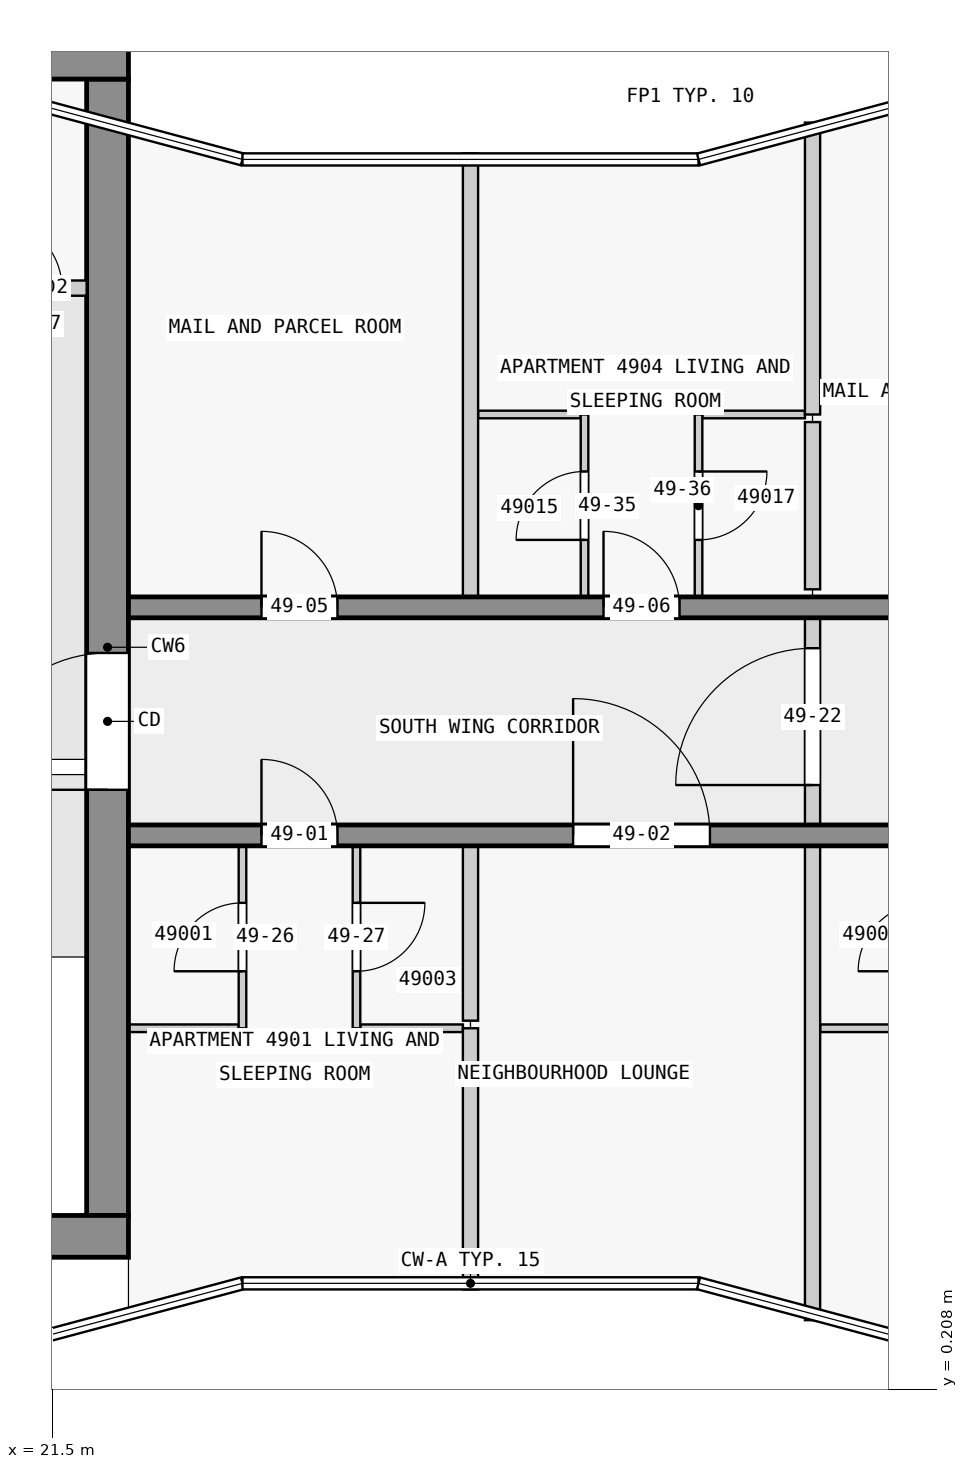
"""IFC4 building model, lengths in metres.
Left out: names, types, materials, properties, quantities, classifications, styles, units other than length and angle.
Written with IfcOpenShell. Run it as: python <this file> out.ifc"""

import sys

from ifc_helpers import new_model, si_unit, direction, frame, frame_2d, origin, place, context, subcontext, project, spatial, rectangle, extrude, element, fill, save


model = new_model("IFC4")
c1 = context("Model", 3, precision=1e-05, world=origin(), true_north=direction((0.0, 1.0)))
c2 = subcontext(c1, "Body", "Model", "MODEL_VIEW")
j1 = project(units=[si_unit("LENGTHUNIT", "METRE"), si_unit("PLANEANGLEUNIT", "RADIAN")], contexts=[c1])
p1 = place(None, origin())
s1 = spatial("IfcSite", under=j1, at=p1, CompositionType="ELEMENT")
p2 = place(p1, origin())
s2 = spatial("IfcBuilding", under=s1, at=p2, CompositionType="ELEMENT")
p3 = place(p2, frame((0.0, 0.0, 190.9)))
s3 = spatial("IfcBuildingStorey", under=s2, at=p3, CompositionType="ELEMENT", Elevation=190.9)
p4 = place(p3, frame((1.75, 2.225, 0.0), z_axis=(0.0, 0.0, 1.0), x_axis=(1.0, 0.0, 0.0)))
e1 = element("IfcWall", 1, at=p4, inside=s3, PredefinedType="SHEAR", context=c2, shape_type="SweptSolid", body=[
    extrude(rectangle(XDim=20.75, YDim=0.55, at=frame_2d((10.375, 0.0))), origin(), (0.0, 0.0, 1.0), 3.25),
])
p5 = place(p3, frame((1.38, 17.725, 0.0), z_axis=(0.0, 0.0, 1.0), x_axis=(1.0, 0.0, 0.0)))
e2 = element("IfcWall", 2, at=p5, inside=s3, PredefinedType="SHEAR", context=c2, shape_type="SweptSolid", body=[
    extrude(rectangle(XDim=21.12, YDim=0.55, at=frame_2d((10.56, 0.0))), origin(), (0.0, 0.0, 1.0), 3.25),
])
p6 = place(p5, frame((6.35, 0.0, 0.0)))
e3 = element("IfcOpeningElement", 3, at=p6, cuts=e2, PredefinedType="OPENING", context=c2, shape_type="SweptSolid", body=[
    extrude(rectangle(XDim=1.8, YDim=2.1, at=frame_2d((0.9, 1.05))), frame((0.0, 0.285, 0.0), z_axis=(0.0, -1.0, 0.0), x_axis=(1.0, 0.0, 0.0)), (0.0, 0.0, 1.0), 0.57),
])
p7 = place(p3, frame((22.225, 2.5, 0.0), z_axis=(0.0, 0.0, 1.0), x_axis=(0.0, 1.0, 0.0)))
e4 = element("IfcWall", 4, at=p7, inside=s3, PredefinedType="SHEAR", context=c2, shape_type="SweptSolid", body=[
    extrude(rectangle(XDim=14.95, YDim=0.55, at=frame_2d((7.475, 0.0))), origin(), (0.0, 0.0, 1.0), 3.25),
])
p8 = place(p7, frame((5.6, 0.0, 0.0)))
e5 = element("IfcOpeningElement", 5, at=p8, cuts=e4, PredefinedType="OPENING", context=c2, shape_type="SweptSolid", body=[
    extrude(rectangle(XDim=1.8, YDim=2.1, at=frame_2d((0.9, 1.05))), frame((0.0, 0.285, 0.0), z_axis=(0.0, -1.0, 0.0), x_axis=(1.0, 0.0, 0.0)), (0.0, 0.0, 1.0), 0.57),
])
p9 = place(p3, frame((22.5, 7.5, 0.0), z_axis=(0.0, 0.0, 1.0), x_axis=(1.0, 0.0, 0.0)))
e6 = element("IfcWall", 6, at=p9, inside=s3, PredefinedType="SHEAR", context=c2, shape_type="SweptSolid", body=[
    extrude(rectangle(XDim=22.5, YDim=0.275, at=frame_2d((11.25, 0.0))), origin(), (0.0, 0.0, 1.0), 3.25),
])
p10 = place(p9, frame((1.75, 0.0, 0.0)))
e7 = element("IfcOpeningElement", 7, at=p10, cuts=e6, PredefinedType="OPENING", context=c2, shape_type="SweptSolid", body=[
    extrude(rectangle(XDim=1.0, YDim=2.1, at=frame_2d((0.5, 1.05))), frame((0.0, 0.147, 0.0), z_axis=(0.0, -1.0, 0.0), x_axis=(1.0, 0.0, 0.0)), (0.0, 0.0, 1.0), 0.295),
])
p11 = place(p9, frame((5.85, 0.0, 0.0)))
e8 = element("IfcOpeningElement", 8, at=p11, cuts=e6, PredefinedType="OPENING", context=c2, shape_type="SweptSolid", body=[
    extrude(rectangle(XDim=1.8, YDim=2.1, at=frame_2d((0.9, 1.05))), frame((0.0, 0.147, 0.0), z_axis=(0.0, -1.0, 0.0), x_axis=(1.0, 0.0, 0.0)), (0.0, 0.0, 1.0), 0.295),
])
p12 = place(p9, frame((10.75, 0.0, 0.0)))
e9 = element("IfcOpeningElement", 9, at=p12, cuts=e6, PredefinedType="OPENING", context=c2, shape_type="SweptSolid", body=[
    extrude(rectangle(XDim=1.0, YDim=2.1, at=frame_2d((0.5, 1.05))), frame((0.0, 0.147, 0.0), z_axis=(0.0, -1.0, 0.0), x_axis=(1.0, 0.0, 0.0)), (0.0, 0.0, 1.0), 0.295),
])
p13 = place(p9, frame((16.85, 0.0, 0.0)))
e10 = element("IfcOpeningElement", 10, at=p13, cuts=e6, PredefinedType="OPENING", context=c2, shape_type="SweptSolid", body=[
    extrude(rectangle(XDim=1.0, YDim=2.1, at=frame_2d((0.5, 1.05))), frame((0.0, 0.147, 0.0), z_axis=(0.0, -1.0, 0.0), x_axis=(1.0, 0.0, 0.0)), (0.0, 0.0, 1.0), 0.295),
])
p14 = place(p3, frame((22.5, 10.5, 0.0), z_axis=(0.0, 0.0, 1.0), x_axis=(1.0, 0.0, 0.0)))
e11 = element("IfcWall", 11, at=p14, inside=s3, PredefinedType="SHEAR", context=c2, shape_type="SweptSolid", body=[
    extrude(rectangle(XDim=22.5, YDim=0.275, at=frame_2d((11.25, 0.0))), origin(), (0.0, 0.0, 1.0), 3.25),
])
p15 = place(p14, frame((1.75, 0.0, 0.0)))
e12 = element("IfcOpeningElement", 12, at=p15, cuts=e11, PredefinedType="OPENING", context=c2, shape_type="SweptSolid", body=[
    extrude(rectangle(XDim=1.0, YDim=2.1, at=frame_2d((0.5, 1.05))), frame((0.0, 0.147, 0.0), z_axis=(0.0, -1.0, 0.0), x_axis=(1.0, 0.0, 0.0)), (0.0, 0.0, 1.0), 0.295),
])
p16 = place(p14, frame((6.25, 0.0, 0.0)))
e13 = element("IfcOpeningElement", 13, at=p16, cuts=e11, PredefinedType="OPENING", context=c2, shape_type="SweptSolid", body=[
    extrude(rectangle(XDim=1.0, YDim=2.1, at=frame_2d((0.5, 1.05))), frame((0.0, 0.147, 0.0), z_axis=(0.0, -1.0, 0.0), x_axis=(1.0, 0.0, 0.0)), (0.0, 0.0, 1.0), 0.295),
])
p17 = place(p14, frame((10.75, 0.0, 0.0)))
e14 = element("IfcOpeningElement", 14, at=p17, cuts=e11, PredefinedType="OPENING", context=c2, shape_type="SweptSolid", body=[
    extrude(rectangle(XDim=1.0, YDim=2.1, at=frame_2d((0.5, 1.05))), frame((0.0, 0.147, 0.0), z_axis=(0.0, -1.0, 0.0), x_axis=(1.0, 0.0, 0.0)), (0.0, 0.0, 1.0), 0.295),
])
p18 = place(p14, frame((15.25, 0.0, 0.0)))
e15 = element("IfcOpeningElement", 15, at=p18, cuts=e11, PredefinedType="OPENING", context=c2, shape_type="SweptSolid", body=[
    extrude(rectangle(XDim=1.0, YDim=2.1, at=frame_2d((0.5, 1.05))), frame((0.0, 0.147, 0.0), z_axis=(0.0, -1.0, 0.0), x_axis=(1.0, 0.0, 0.0)), (0.0, 0.0, 1.0), 0.295),
])
p19 = place(p14, frame((18.75, 0.0, 0.0)))
e16 = element("IfcOpeningElement", 16, at=p19, cuts=e11, PredefinedType="OPENING", context=c2, shape_type="SweptSolid", body=[
    extrude(rectangle(XDim=0.9, YDim=2.1, at=frame_2d((0.45, 1.05))), frame((0.0, 0.147, 0.0), z_axis=(0.0, -1.0, 0.0), x_axis=(1.0, 0.0, 0.0)), (0.0, 0.0, 1.0), 0.295),
])
p20 = place(p14, frame((20.95, 0.0, 0.0)))
e17 = element("IfcOpeningElement", 17, at=p20, cuts=e11, PredefinedType="OPENING", context=c2, shape_type="SweptSolid", body=[
    extrude(rectangle(XDim=1.0, YDim=2.1, at=frame_2d((0.5, 1.05))), frame((0.0, 0.147, 0.0), z_axis=(0.0, -1.0, 0.0), x_axis=(1.0, 0.0, 0.0)), (0.0, 0.0, 1.0), 0.295),
])
p21 = place(p3, frame((18.6, 14.7, 0.0), z_axis=(0.0, 0.0, 1.0), x_axis=(1.0, 0.0, 0.0)))
e18 = element("IfcWall", 18, at=p21, inside=s3, PredefinedType="PARTITIONING", context=c2, shape_type="SweptSolid", body=[
    extrude(rectangle(XDim=3.35, YDim=0.2, at=frame_2d((1.675, 0.0))), origin(), (0.0, 0.0, 1.0), 3.25),
])
p22 = place(p21, frame((0.45, 0.0, 0.0)))
e19 = element("IfcOpeningElement", 19, at=p22, cuts=e18, PredefinedType="OPENING", context=c2, shape_type="SweptSolid", body=[
    extrude(rectangle(XDim=0.9, YDim=2.1, at=frame_2d((0.45, 1.05))), frame((0.0, 0.11, 0.0), z_axis=(0.0, -1.0, 0.0), x_axis=(1.0, 0.0, 0.0)), (0.0, 0.0, 1.0), 0.22),
])
p23 = place(p21, frame((2.125, 0.0, 0.0)))
e20 = element("IfcOpeningElement", 20, at=p23, cuts=e18, PredefinedType="OPENING", context=c2, shape_type="SweptSolid", body=[
    extrude(rectangle(XDim=0.9, YDim=2.1, at=frame_2d((0.45, 1.05))), frame((0.0, 0.11, 0.0), z_axis=(0.0, -1.0, 0.0), x_axis=(1.0, 0.0, 0.0)), (0.0, 0.0, 1.0), 0.22),
])
p24 = place(p3, frame((22.5, 4.962, 0.0), z_axis=(0.0, 0.0, 1.0), x_axis=(1.0, 0.0, 0.0)))
e21 = element("IfcWall", 21, at=p24, inside=s3, PredefinedType="PARTITIONING", context=c2, shape_type="SweptSolid", body=[
    extrude(rectangle(XDim=1.45, YDim=0.1, at=frame_2d((0.725, 0.0))), origin(), (0.0, 0.0, 1.0), 3.25),
])
for number, where, z_axis, x_axis in (
    (22, (25.55, 4.962, 0.0), (0.0, 0.0, 1.0), (1.0, 0.0, 0.0)),
    (23, (31.6, 4.962, 0.0), (0.0, 0.0, 1.0), (1.0, 0.0, 0.0)),
    (24, (28.45, 13.038, 0.0), (0.0, 0.0, 1.0), (-1.0, 0.0, 0.0)),
    (25, (31.4, 13.038, 0.0), (0.0, 0.0, 1.0), (-1.0, 0.0, 0.0)),
):
    element("IfcWall", number, at=place(p3, frame(where, z_axis=z_axis, x_axis=x_axis)), inside=s3, PredefinedType="PARTITIONING", context=c2, shape_type="SweptSolid", body=[
        extrude(rectangle(XDim=1.35, YDim=0.1, at=frame_2d((0.675, 0.0))), origin(), (0.0, 0.0, 1.0), 3.25),
    ])
p25 = place(p3, frame((24.0, 4.962, 0.0), z_axis=(0.0, 0.0, 1.0), x_axis=(0.0, 1.0, 0.0)))
e26 = element("IfcWall", 26, at=p25, inside=s3, PredefinedType="PARTITIONING", context=c2, shape_type="SweptSolid", body=[
    extrude(rectangle(XDim=2.4, YDim=0.1, at=frame_2d((1.2, 0.0))), origin(), (0.0, 0.0, 1.0), 3.25),
])
p26 = place(p25, frame((0.75, 0.0, 0.0)))
e27 = element("IfcOpeningElement", 27, at=p26, cuts=e26, PredefinedType="OPENING", context=c2, shape_type="SweptSolid", body=[
    extrude(rectangle(XDim=0.9, YDim=2.1, at=frame_2d((0.45, 1.05))), frame((0.0, 0.06, 0.0), z_axis=(0.0, -1.0, 0.0), x_axis=(1.0, 0.0, 0.0)), (0.0, 0.0, 1.0), 0.12),
])
p27 = place(p3, frame((25.5, 7.363, 0.0), z_axis=(0.0, 0.0, 1.0), x_axis=(0.0, -1.0, 0.0)))
e28 = element("IfcWall", 28, at=p27, inside=s3, PredefinedType="PARTITIONING", context=c2, shape_type="SweptSolid", body=[
    extrude(rectangle(XDim=2.4, YDim=0.1, at=frame_2d((1.2, 0.0))), origin(), (0.0, 0.0, 1.0), 3.25),
])
p28 = place(p27, frame((0.75, 0.0, 0.0)))
e29 = element("IfcOpeningElement", 29, at=p28, cuts=e28, PredefinedType="OPENING", context=c2, shape_type="SweptSolid", body=[
    extrude(rectangle(XDim=0.9, YDim=2.1, at=frame_2d((0.45, 1.05))), frame((0.0, 0.06, 0.0), z_axis=(0.0, -1.0, 0.0), x_axis=(1.0, 0.0, 0.0)), (0.0, 0.0, 1.0), 0.12),
])
p29 = place(p3, frame((27.0, 4.962, 0.0), z_axis=(0.0, 0.0, 1.0), x_axis=(0.0, -1.0, 0.0)))
e30 = element("IfcWall", 30, at=p29, inside=s3, PredefinedType="PARTITIONING", context=c2, shape_type="SweptSolid", body=[
    extrude(rectangle(XDim=3.436, YDim=0.2, at=frame_2d((1.718, 0.0))), origin(), (0.0, 0.0, 1.0), 3.25),
])
p30 = place(p3, frame((27.0, 5.062, 0.0), z_axis=(0.0, 0.0, 1.0), x_axis=(0.0, 1.0, 0.0)))
e31 = element("IfcWall", 31, at=p30, inside=s3, PredefinedType="PARTITIONING", context=c2, shape_type="SweptSolid", body=[
    extrude(rectangle(XDim=2.3, YDim=0.2, at=frame_2d((1.15, 0.0))), origin(), (0.0, 0.0, 1.0), 3.25),
])
p31 = place(p3, frame((27.0, 10.637, 0.0), z_axis=(0.0, 0.0, 1.0), x_axis=(0.0, 1.0, 0.0)))
e32 = element("IfcWall", 32, at=p31, inside=s3, PredefinedType="PARTITIONING", context=c2, shape_type="SweptSolid", body=[
    extrude(rectangle(XDim=5.836, YDim=0.2, at=frame_2d((2.918, 0.0))), origin(), (0.0, 0.0, 1.0), 3.25),
])
p32 = place(p3, frame((28.5, 10.637, 0.0), z_axis=(0.0, 0.0, 1.0), x_axis=(0.0, 1.0, 0.0)))
e33 = element("IfcWall", 33, at=p32, inside=s3, PredefinedType="PARTITIONING", context=c2, shape_type="SweptSolid", body=[
    extrude(rectangle(XDim=2.4, YDim=0.1, at=frame_2d((1.2, 0.0))), origin(), (0.0, 0.0, 1.0), 3.25),
])
p33 = place(p32, frame((0.75, 0.0, 0.0)))
e34 = element("IfcOpeningElement", 34, at=p33, cuts=e33, PredefinedType="OPENING", context=c2, shape_type="SweptSolid", body=[
    extrude(rectangle(XDim=0.9, YDim=2.1, at=frame_2d((0.45, 1.05))), frame((0.0, 0.06, 0.0), z_axis=(0.0, -1.0, 0.0), x_axis=(1.0, 0.0, 0.0)), (0.0, 0.0, 1.0), 0.12),
])
p34 = place(p3, frame((30.0, 13.038, 0.0), z_axis=(0.0, 0.0, 1.0), x_axis=(0.0, -1.0, 0.0)))
e35 = element("IfcWall", 35, at=p34, inside=s3, PredefinedType="PARTITIONING", context=c2, shape_type="SweptSolid", body=[
    extrude(rectangle(XDim=2.4, YDim=0.1, at=frame_2d((1.2, 0.0))), origin(), (0.0, 0.0, 1.0), 3.25),
])
p35 = place(p34, frame((0.75, 0.0, 0.0)))
e36 = element("IfcOpeningElement", 36, at=p35, cuts=e35, PredefinedType="OPENING", context=c2, shape_type="SweptSolid", body=[
    extrude(rectangle(XDim=0.9, YDim=2.1, at=frame_2d((0.45, 1.05))), frame((0.0, 0.06, 0.0), z_axis=(0.0, -1.0, 0.0), x_axis=(1.0, 0.0, 0.0)), (0.0, 0.0, 1.0), 0.12),
])
p36 = place(p3, frame((31.5, 16.878, 0.0), z_axis=(0.0, 0.0, 1.0), x_axis=(0.0, -1.0, 0.0)))
e37 = element("IfcWall", 37, at=p36, inside=s3, PredefinedType="PARTITIONING", context=c2, shape_type="SweptSolid", body=[
    extrude(rectangle(XDim=3.84, YDim=0.2, at=frame_2d((1.92, 0.0))), origin(), (0.0, 0.0, 1.0), 3.25),
])
p37 = place(p3, frame((31.5, 1.122, 0.0), z_axis=(0.0, 0.0, 1.0), x_axis=(0.0, 1.0, 0.0)))
e38 = element("IfcWall", 38, at=p37, inside=s3, PredefinedType="PARTITIONING", context=c2, shape_type="SweptSolid", body=[
    extrude(rectangle(XDim=6.24, YDim=0.2, at=frame_2d((3.12, 0.0))), origin(), (0.0, 0.0, 1.0), 3.25),
])
p38 = place(p3, frame((31.5, 10.738, 0.0), z_axis=(0.0, 0.0, 1.0), x_axis=(0.0, 1.0, 0.0)))
e39 = element("IfcWall", 39, at=p38, inside=s3, PredefinedType="PARTITIONING", context=c2, shape_type="SweptSolid", body=[
    extrude(rectangle(XDim=2.2, YDim=0.2, at=frame_2d((1.1, 0.0))), origin(), (0.0, 0.0, 1.0), 3.25),
])
p39 = place(p3, frame((31.5, 7.462, 0.0), z_axis=(0.0, 0.0, 1.0), x_axis=(0.0, 1.0, 0.0)))
e40 = element("IfcWall", 40, at=p39, inside=s3, PredefinedType="PARTITIONING", context=c2, shape_type="SweptSolid", body=[
    extrude(rectangle(XDim=3.175, YDim=0.2, at=frame_2d((1.587, 0.0))), origin(), (0.0, 0.0, 1.0), 3.25),
])
p40 = place(p39, frame((0.7, 0.0, 0.0)))
e41 = element("IfcOpeningElement", 41, at=p40, cuts=e40, PredefinedType="OPENING", context=c2, shape_type="SweptSolid", body=[
    extrude(rectangle(XDim=1.8, YDim=2.1, at=frame_2d((0.9, 1.05))), frame((0.0, 0.11, 0.0), z_axis=(0.0, -1.0, 0.0), x_axis=(1.0, 0.0, 0.0)), (0.0, 0.0, 1.0), 0.22),
])
p41 = place(p8, origin())
e42 = element("IfcDoor", 42, at=p41, inside=s3, OperationType="DOUBLE_DOOR_SINGLE_SWING", PredefinedType="DOOR", context=c2, shape_type="SweptSolid", body=[
    extrude(rectangle(XDim=1.8, YDim=2.1, at=frame_2d((0.9, 1.05))), frame((0.0, 0.025, 0.0), z_axis=(0.0, -1.0, 0.0), x_axis=(1.0, 0.0, 0.0)), (0.0, 0.0, 1.0), 0.05),
])
fill(e5, e42)
p42 = place(p23, origin())
e43 = element("IfcDoor", 43, at=p42, inside=s3, OperationType="SINGLE_SWING_LEFT", PredefinedType="DOOR", context=c2, shape_type="SweptSolid", body=[
    extrude(rectangle(XDim=0.9, YDim=2.1, at=frame_2d((0.45, 1.05))), frame((0.0, 0.025, 0.0), z_axis=(0.0, -1.0, 0.0), x_axis=(1.0, 0.0, 0.0)), (0.0, 0.0, 1.0), 0.05),
])
fill(e20, e43)
p43 = place(p10, origin())
e44 = element("IfcDoor", 44, at=p43, inside=s3, OperationType="SINGLE_SWING_LEFT", PredefinedType="DOOR", context=c2, shape_type="SweptSolid", body=[
    extrude(rectangle(XDim=1.0, YDim=2.1, at=frame_2d((0.5, 1.05))), frame((0.0, 0.025, 0.0), z_axis=(0.0, -1.0, 0.0), x_axis=(1.0, 0.0, 0.0)), (0.0, 0.0, 1.0), 0.05),
])
fill(e7, e44)
p44 = place(p11, origin())
e45 = element("IfcDoor", 45, at=p44, inside=s3, OperationType="SINGLE_SWING_LEFT", PredefinedType="DOOR", context=c2, shape_type="SweptSolid", body=[
    extrude(rectangle(XDim=1.8, YDim=2.1, at=frame_2d((0.9, 1.05))), frame((0.0, 0.025, 0.0), z_axis=(0.0, -1.0, 0.0), x_axis=(1.0, 0.0, 0.0)), (0.0, 0.0, 1.0), 0.05),
])
fill(e8, e45)
p45 = place(p15, origin())
e46 = element("IfcDoor", 46, at=p45, inside=s3, OperationType="SINGLE_SWING_LEFT", PredefinedType="DOOR", context=c2, shape_type="SweptSolid", body=[
    extrude(rectangle(XDim=1.0, YDim=2.1, at=frame_2d((0.5, 1.05))), frame((0.0, 0.025, 0.0), z_axis=(0.0, -1.0, 0.0), x_axis=(1.0, 0.0, 0.0)), (0.0, 0.0, 1.0), 0.05),
])
fill(e12, e46)
p46 = place(p16, origin())
e47 = element("IfcDoor", 47, at=p46, inside=s3, OperationType="SINGLE_SWING_LEFT", PredefinedType="DOOR", context=c2, shape_type="SweptSolid", body=[
    extrude(rectangle(XDim=1.0, YDim=2.1, at=frame_2d((0.5, 1.05))), frame((0.0, 0.025, 0.0), z_axis=(0.0, -1.0, 0.0), x_axis=(1.0, 0.0, 0.0)), (0.0, 0.0, 1.0), 0.05),
])
fill(e13, e47)
p47 = place(p40, origin())
e48 = element("IfcDoor", 48, at=p47, inside=s3, OperationType="SINGLE_SWING_RIGHT", PredefinedType="DOOR", context=c2, shape_type="SweptSolid", body=[
    extrude(rectangle(XDim=1.8, YDim=2.1, at=frame_2d((0.9, 1.05))), frame((0.0, 0.025, 0.0), z_axis=(0.0, -1.0, 0.0), x_axis=(1.0, 0.0, 0.0)), (0.0, 0.0, 1.0), 0.05),
])
fill(e41, e48)
p48 = place(p26, origin())
e49 = element("IfcDoor", 49, at=p48, inside=s3, OperationType="SINGLE_SWING_RIGHT", PredefinedType="DOOR", context=c2, shape_type="SweptSolid", body=[
    extrude(rectangle(XDim=0.9, YDim=2.1, at=frame_2d((0.45, 1.05))), frame((0.0, 0.025, 0.0), z_axis=(0.0, -1.0, 0.0), x_axis=(1.0, 0.0, 0.0)), (0.0, 0.0, 1.0), 0.05),
])
fill(e27, e49)
p49 = place(p28, origin())
e50 = element("IfcDoor", 50, at=p49, inside=s3, OperationType="SINGLE_SWING_RIGHT", PredefinedType="DOOR", context=c2, shape_type="SweptSolid", body=[
    extrude(rectangle(XDim=0.9, YDim=2.1, at=frame_2d((0.45, 1.05))), frame((0.0, 0.025, 0.0), z_axis=(0.0, -1.0, 0.0), x_axis=(1.0, 0.0, 0.0)), (0.0, 0.0, 1.0), 0.05),
])
fill(e29, e50)
p50 = place(p33, origin())
e51 = element("IfcDoor", 51, at=p50, inside=s3, OperationType="SINGLE_SWING_LEFT", PredefinedType="DOOR", context=c2, shape_type="SweptSolid", body=[
    extrude(rectangle(XDim=0.9, YDim=2.1, at=frame_2d((0.45, 1.05))), frame((0.0, 0.025, 0.0), z_axis=(0.0, -1.0, 0.0), x_axis=(1.0, 0.0, 0.0)), (0.0, 0.0, 1.0), 0.05),
])
fill(e34, e51)
p51 = place(p35, origin())
e52 = element("IfcDoor", 52, at=p51, inside=s3, OperationType="SINGLE_SWING_LEFT", PredefinedType="DOOR", context=c2, shape_type="SweptSolid", body=[
    extrude(rectangle(XDim=0.9, YDim=2.1, at=frame_2d((0.45, 1.05))), frame((0.0, 0.025, 0.0), z_axis=(0.0, -1.0, 0.0), x_axis=(1.0, 0.0, 0.0)), (0.0, 0.0, 1.0), 0.05),
])
fill(e36, e52)
save(model, sys.argv[1])
